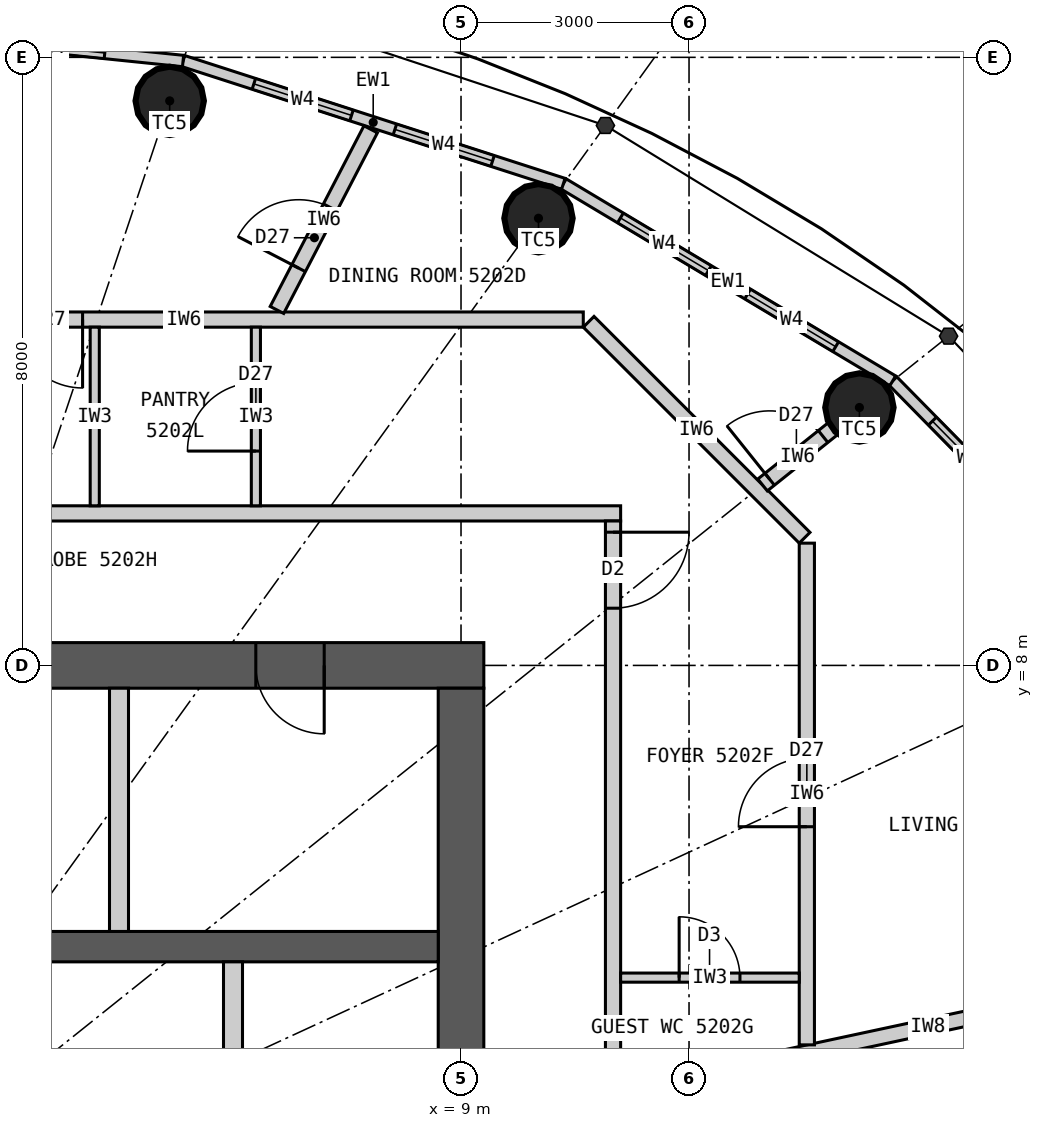
"""IFC4 building model, lengths in metres.
Left out: names, types, materials, properties, quantities, classifications, styles, units other than length and angle.
Written with IfcOpenShell. Run it as: python <this file> out.ifc"""

import sys

from ifc_helpers import new_model, si_unit, direction, frame, frame_2d, origin, origin_2d, place, context, subcontext, project, spatial, rectangle, circle, extrude, element, fill, save


model = new_model("IFC4")
c1 = context("Model", 3, precision=1e-05, world=origin(), true_north=direction((0.0, 1.0)))
c2 = subcontext(c1, "Body", "Model", "MODEL_VIEW")
j1 = project(units=[si_unit("LENGTHUNIT", "METRE"), si_unit("PLANEANGLEUNIT", "RADIAN")], contexts=[c1])
p1 = place(None, origin())
s1 = spatial("IfcSite", under=j1, at=p1, CompositionType="ELEMENT")
p2 = place(p1, origin())
s2 = spatial("IfcBuilding", under=s1, at=p2, CompositionType="ELEMENT")
p3 = place(p2, frame((0.0, 0.0, 196.2)))
s3 = spatial("IfcBuildingStorey", under=s2, at=p3, CompositionType="ELEMENT", Elevation=196.2)
for number, where, z_axis, x_axis in (
    (1, (14.241, 11.393, 0.0), (0.0, 0.0, 1.0), (1.0, 0.0, 0.0)),
    (2, (10.019, 13.883, 0.0), (0.0, 0.0, 1.0), (1.0, 0.0, 0.0)),
    (3, (5.167, 15.427, 0.0), (0.0, 0.0, 1.0), (1.0, 0.0, 0.0)),
):
    element("IfcColumn", number, at=place(p3, frame(where, z_axis=z_axis, x_axis=x_axis)), inside=s3, PredefinedType="COLUMN", context=c2, shape_type="SweptSolid", body=[
        extrude(circle(Radius=0.45, at=origin_2d()), origin(), (0.0, 0.0, 1.0), 3.3),
    ])
p4 = place(p3, frame((-9.3, 8.0, 0.0), z_axis=(0.0, 0.0, 1.0), x_axis=(1.0, 0.0, 0.0)))
e4 = element("IfcWall", 4, at=p4, inside=s3, PredefinedType="SHEAR", context=c2, shape_type="SweptSolid", body=[
    extrude(rectangle(XDim=18.6, YDim=0.6, at=frame_2d((9.3, 0.0))), origin(), (0.0, 0.0, 1.0), 3.3),
])
p5 = place(p4, frame((8.0, 0.0, 0.0)))
e5 = element("IfcOpeningElement", 5, at=p5, cuts=e4, PredefinedType="OPENING", context=c2, shape_type="SweptSolid", body=[
    extrude(rectangle(XDim=1.2, YDim=2.2, at=frame_2d((0.6, 1.1))), frame((0.0, 0.31, 0.0), z_axis=(0.0, -1.0, 0.0), x_axis=(1.0, 0.0, 0.0)), (0.0, 0.0, 1.0), 0.62),
])
p6 = place(p4, frame((15.6, 0.0, 0.0)))
e6 = element("IfcOpeningElement", 6, at=p6, cuts=e4, PredefinedType="OPENING", context=c2, shape_type="SweptSolid", body=[
    extrude(rectangle(XDim=0.9, YDim=2.2, at=frame_2d((0.45, 1.1))), frame((0.0, 0.31, 0.0), z_axis=(0.0, -1.0, 0.0), x_axis=(1.0, 0.0, 0.0)), (0.0, 0.0, 1.0), 0.62),
])
p7 = place(p3, frame((9.0, -7.7, 0.0), z_axis=(0.0, 0.0, 1.0), x_axis=(0.0, 1.0, 0.0)))
e7 = element("IfcWall", 7, at=p7, inside=s3, PredefinedType="SHEAR", context=c2, shape_type="SweptSolid", body=[
    extrude(rectangle(XDim=15.4, YDim=0.6, at=frame_2d((7.7, 0.0))), origin(), (0.0, 0.0, 1.0), 3.3),
])
p8 = place(p7, frame((6.8, 0.0, 0.0)))
e8 = element("IfcOpeningElement", 8, at=p8, cuts=e7, PredefinedType="OPENING", context=c2, shape_type="SweptSolid", body=[
    extrude(rectangle(XDim=1.8, YDim=2.2, at=frame_2d((0.9, 1.1))), frame((0.0, 0.31, 0.0), z_axis=(0.0, -1.0, 0.0), x_axis=(1.0, 0.0, 0.0)), (0.0, 0.0, 1.0), 0.62),
])
p9 = place(p3, frame((-8.7, 4.3, 0.0), z_axis=(0.0, 0.0, 1.0), x_axis=(1.0, 0.0, 0.0)))
e9 = element("IfcWall", 9, at=p9, inside=s3, PredefinedType="SHEAR", context=c2, shape_type="SweptSolid", body=[
    extrude(rectangle(XDim=17.4, YDim=0.4, at=frame_2d((8.7, 0.0))), origin(), (0.0, 0.0, 1.0), 3.3),
])
p10 = place(p3, frame((4.5, 4.5, 0.0), z_axis=(0.0, 0.0, 1.0), x_axis=(0.0, 1.0, 0.0)))
e10 = element("IfcWall", 10, at=p10, inside=s3, PredefinedType="PARTITIONING", context=c2, shape_type="SweptSolid", body=[
    extrude(rectangle(XDim=3.2, YDim=0.25, at=frame_2d((1.6, 0.0))), origin(), (0.0, 0.0, 1.0), 3.3),
])
p11 = place(p3, frame((6.0, 1.75, 0.0), z_axis=(0.0, 0.0, 1.0), x_axis=(0.0, 1.0, 0.0)))
e11 = element("IfcWall", 11, at=p11, inside=s3, PredefinedType="PARTITIONING", context=c2, shape_type="SweptSolid", body=[
    extrude(rectangle(XDim=2.35, YDim=0.25, at=frame_2d((1.175, 0.0))), origin(), (0.0, 0.0, 1.0), 3.3),
])
p12 = place(p3, frame((18.04, 8.332, 0.0), z_axis=(0.0, 0.0, 1.0), x_axis=(-0.701527379618, 0.712642501993, 0.0)))
e12 = element("IfcWall", 12, at=p12, inside=s3, PredefinedType="ELEMENTEDWALL", context=c2, shape_type="SweptSolid", body=[
    extrude(rectangle(XDim=4.788, YDim=0.15, at=frame_2d((2.394, 0.0))), origin(), (0.0, 0.0, 1.0), 3.12),
])
p13 = place(p12, frame((0.744, 0.0, 0.9)))
e13 = element("IfcOpeningElement", 13, at=p13, cuts=e12, PredefinedType="OPENING", context=c2, shape_type="SweptSolid", body=[
    extrude(rectangle(XDim=1.35, YDim=1.9, at=frame_2d((0.675, 0.95))), frame((0.0, 0.085, 0.0), z_axis=(0.0, -1.0, 0.0), x_axis=(1.0, 0.0, 0.0)), (0.0, 0.0, 1.0), 0.17),
])
p14 = place(p12, frame((2.694, 0.0, 0.9)))
e14 = element("IfcOpeningElement", 14, at=p14, cuts=e12, PredefinedType="OPENING", context=c2, shape_type="SweptSolid", body=[
    extrude(rectangle(XDim=1.35, YDim=1.9, at=frame_2d((0.675, 0.95))), frame((0.0, 0.085, 0.0), z_axis=(0.0, -1.0, 0.0), x_axis=(1.0, 0.0, 0.0)), (0.0, 0.0, 1.0), 0.17),
])
p15 = place(p3, frame((14.68, 11.744, 0.0), z_axis=(0.0, 0.0, 1.0), x_axis=(-0.85822150553, 0.513279502265, 0.0)))
e15 = element("IfcWall", 15, at=p15, inside=s3, PredefinedType="ELEMENTEDWALL", context=c2, shape_type="SweptSolid", body=[
    extrude(rectangle(XDim=5.05, YDim=0.15, at=frame_2d((2.525, 0.0))), origin(), (0.0, 0.0, 1.0), 3.12),
])
p16 = place(p15, frame((0.875, 0.0, 0.9)))
e16 = element("IfcOpeningElement", 16, at=p16, cuts=e15, PredefinedType="OPENING", context=c2, shape_type="SweptSolid", body=[
    extrude(rectangle(XDim=1.35, YDim=1.9, at=frame_2d((0.675, 0.95))), frame((0.0, 0.085, 0.0), z_axis=(0.0, -1.0, 0.0), x_axis=(1.0, 0.0, 0.0)), (0.0, 0.0, 1.0), 0.17),
])
p17 = place(p15, frame((2.825, 0.0, 0.9)))
e17 = element("IfcOpeningElement", 17, at=p17, cuts=e15, PredefinedType="OPENING", context=c2, shape_type="SweptSolid", body=[
    extrude(rectangle(XDim=1.35, YDim=1.9, at=frame_2d((0.675, 0.95))), frame((0.0, 0.085, 0.0), z_axis=(0.0, -1.0, 0.0), x_axis=(1.0, 0.0, 0.0)), (0.0, 0.0, 1.0), 0.17),
])
p18 = place(p3, frame((10.346, 14.336, 0.0), z_axis=(0.0, 0.0, 1.0), x_axis=(-0.951644702515, 0.307200846638, 0.0)))
e18 = element("IfcWall", 18, at=p18, inside=s3, PredefinedType="ELEMENTEDWALL", context=c2, shape_type="SweptSolid", body=[
    extrude(rectangle(XDim=5.258, YDim=0.15, at=frame_2d((2.629, 0.0))), origin(), (0.0, 0.0, 1.0), 3.12),
])
p19 = place(p18, frame((0.979, 0.0, 0.9)))
e19 = element("IfcOpeningElement", 19, at=p19, cuts=e18, PredefinedType="OPENING", context=c2, shape_type="SweptSolid", body=[
    extrude(rectangle(XDim=1.35, YDim=1.9, at=frame_2d((0.675, 0.95))), frame((0.0, 0.085, 0.0), z_axis=(0.0, -1.0, 0.0), x_axis=(1.0, 0.0, 0.0)), (0.0, 0.0, 1.0), 0.17),
])
p20 = place(p18, frame((2.929, 0.0, 0.9)))
e20 = element("IfcOpeningElement", 20, at=p20, cuts=e18, PredefinedType="OPENING", context=c2, shape_type="SweptSolid", body=[
    extrude(rectangle(XDim=1.35, YDim=1.9, at=frame_2d((0.675, 0.95))), frame((0.0, 0.085, 0.0), z_axis=(0.0, -1.0, 0.0), x_axis=(1.0, 0.0, 0.0)), (0.0, 0.0, 1.0), 0.17),
])
p21 = place(p3, frame((5.343, 15.952, 0.0), z_axis=(0.0, 0.0, 1.0), x_axis=(-0.994774574972, 0.102095763818, 0.0)))
e21 = element("IfcWall", 21, at=p21, inside=s3, PredefinedType="ELEMENTEDWALL", context=c2, shape_type="SweptSolid", body=[
    extrude(rectangle(XDim=5.371, YDim=0.15, at=frame_2d((2.686, 0.0))), origin(), (0.0, 0.0, 1.0), 3.12),
])
p22 = place(p21, frame((1.035, 0.0, 0.9)))
e22 = element("IfcOpeningElement", 22, at=p22, cuts=e21, PredefinedType="OPENING", context=c2, shape_type="SweptSolid", body=[
    extrude(rectangle(XDim=1.35, YDim=1.9, at=frame_2d((0.675, 0.95))), frame((0.0, 0.085, 0.0), z_axis=(0.0, -1.0, 0.0), x_axis=(1.0, 0.0, 0.0)), (0.0, 0.0, 1.0), 0.17),
])
p23 = place(p21, frame((2.985, 0.0, 0.9)))
e23 = element("IfcOpeningElement", 23, at=p23, cuts=e21, PredefinedType="OPENING", context=c2, shape_type="SweptSolid", body=[
    extrude(rectangle(XDim=1.35, YDim=1.9, at=frame_2d((0.675, 0.95))), frame((0.0, 0.085, 0.0), z_axis=(0.0, -1.0, 0.0), x_axis=(1.0, 0.0, 0.0)), (0.0, 0.0, 1.0), 0.17),
])
p24 = place(p3, frame((-11.1, 10.0, 0.0), z_axis=(0.0, 0.0, 1.0), x_axis=(1.0, 0.0, 0.0)))
e24 = element("IfcWall", 24, at=p24, inside=s3, PredefinedType="PARTITIONING", context=c2, shape_type="SweptSolid", body=[
    extrude(rectangle(XDim=22.2, YDim=0.2, at=frame_2d((11.1, 0.0))), origin(), (0.0, 0.0, 1.0), 3.12),
])
p25 = place(p24, frame((2.309, 0.0, 0.0)))
e25 = element("IfcOpeningElement", 25, at=p25, cuts=e24, PredefinedType="OPENING", context=c2, shape_type="SweptSolid", body=[
    extrude(rectangle(XDim=1.0, YDim=2.2, at=frame_2d((0.5, 1.1))), frame((0.0, 0.11, 0.0), z_axis=(0.0, -1.0, 0.0), x_axis=(1.0, 0.0, 0.0)), (0.0, 0.0, 1.0), 0.22),
])
p26 = place(p3, frame((11.0, -9.9, 0.0), z_axis=(0.0, 0.0, 1.0), x_axis=(0.0, 1.0, 0.0)))
e26 = element("IfcWall", 26, at=p26, inside=s3, PredefinedType="PARTITIONING", context=c2, shape_type="SweptSolid", body=[
    extrude(rectangle(XDim=19.8, YDim=0.2, at=frame_2d((9.9, 0.0))), origin(), (0.0, 0.0, 1.0), 3.12),
])
p27 = place(p26, frame((10.32, 0.0, 0.0)))
e27 = element("IfcOpeningElement", 27, at=p27, cuts=e26, PredefinedType="OPENING", context=c2, shape_type="SweptSolid", body=[
    extrude(rectangle(XDim=1.0, YDim=2.2, at=frame_2d((0.5, 1.1))), frame((0.0, 0.11, 0.0), z_axis=(0.0, -1.0, 0.0), x_axis=(1.0, 0.0, 0.0)), (0.0, 0.0, 1.0), 0.22),
])
p28 = place(p26, frame((18.653, 0.0, 0.0)))
e28 = element("IfcOpeningElement", 28, at=p28, cuts=e26, PredefinedType="OPENING", context=c2, shape_type="SweptSolid", body=[
    extrude(rectangle(XDim=1.0, YDim=2.2, at=frame_2d((0.5, 1.1))), frame((0.0, 0.11, 0.0), z_axis=(0.0, -1.0, 0.0), x_axis=(1.0, 0.0, 0.0)), (0.0, 0.0, 1.0), 0.22),
])
p29 = place(p26, frame((0.379, 0.0, 0.0)))
e29 = element("IfcOpeningElement", 29, at=p29, cuts=e26, PredefinedType="OPENING", context=c2, shape_type="SweptSolid", body=[
    extrude(rectangle(XDim=1.0, YDim=2.2, at=frame_2d((0.5, 1.1))), frame((0.0, 0.11, 0.0), z_axis=(0.0, -1.0, 0.0), x_axis=(1.0, 0.0, 0.0)), (0.0, 0.0, 1.0), 0.22),
])
p30 = place(p3, frame((11.1, 2.379, 0.0), z_axis=(0.0, 0.0, 1.0), x_axis=(0.977789888126, 0.209587534647, 0.0)))
e30 = element("IfcWall", 30, at=p30, inside=s3, PredefinedType="PARTITIONING", context=c2, shape_type="SweptSolid", body=[
    extrude(rectangle(XDim=8.273, YDim=0.2, at=frame_2d((4.136, 0.0))), origin(), (0.0, 0.0, 1.0), 2.42),
])
p31 = place(p3, frame((13.55, 3.008, 0.0), z_axis=(0.0, 0.0, 1.0), x_axis=(0.0, 1.0, 0.0)))
e31 = element("IfcWall", 31, at=p31, inside=s3, PredefinedType="PARTITIONING", context=c2, shape_type="SweptSolid", body=[
    extrude(rectangle(XDim=6.601, YDim=0.2, at=frame_2d((3.3, 0.0))), origin(), (0.0, 0.0, 1.0), 3.12),
])
p32 = place(p31, frame((2.87, 0.0, 0.0)))
e32 = element("IfcOpeningElement", 32, at=p32, cuts=e31, PredefinedType="OPENING", context=c2, shape_type="SweptSolid", body=[
    extrude(rectangle(XDim=0.9, YDim=2.1, at=frame_2d((0.45, 1.05))), frame((0.0, 0.11, 0.0), z_axis=(0.0, -1.0, 0.0), x_axis=(1.0, 0.0, 0.0)), (0.0, 0.0, 1.0), 0.22),
])
p33 = place(p3, frame((13.521, 9.679, 0.0), z_axis=(0.0, 0.0, 1.0), x_axis=(-0.707106781187, 0.707106781187, 0.0)))
e33 = element("IfcWall", 33, at=p33, inside=s3, PredefinedType="PARTITIONING", context=c2, shape_type="SweptSolid", body=[
    extrude(rectangle(XDim=4.019, YDim=0.2, at=frame_2d((2.009, 0.0))), origin(), (0.0, 0.0, 1.0), 3.12),
])
p34 = place(p3, frame((10.609, 12.55, 0.0), z_axis=(0.0, 0.0, 1.0), x_axis=(-1.0, 0.0, 0.0)))
e34 = element("IfcWall", 34, at=p34, inside=s3, PredefinedType="PARTITIONING", context=c2, shape_type="SweptSolid", body=[
    extrude(rectangle(XDim=10.508, YDim=0.2, at=frame_2d((5.254, 0.0))), origin(), (0.0, 0.0, 1.0), 3.12),
])
p35 = place(p34, frame((6.588, 0.0, 0.0)))
e35 = element("IfcOpeningElement", 35, at=p35, cuts=e34, PredefinedType="OPENING", context=c2, shape_type="SweptSolid", body=[
    extrude(rectangle(XDim=0.9, YDim=2.1, at=frame_2d((0.45, 1.05))), frame((0.0, 0.11, 0.0), z_axis=(0.0, -1.0, 0.0), x_axis=(1.0, 0.0, 0.0)), (0.0, 0.0, 1.0), 0.22),
])
p36 = place(p34, frame((8.308, 0.0, 0.0)))
e36 = element("IfcOpeningElement", 36, at=p36, cuts=e34, PredefinedType="OPENING", context=c2, shape_type="SweptSolid", body=[
    extrude(rectangle(XDim=0.8, YDim=2.1, at=frame_2d((0.4, 1.05))), frame((0.0, 0.11, 0.0), z_axis=(0.0, -1.0, 0.0), x_axis=(1.0, 0.0, 0.0)), (0.0, 0.0, 1.0), 0.22),
])
p37 = place(p3, frame((12.968, 10.374, 0.0), z_axis=(0.0, 0.0, 1.0), x_axis=(0.780888968944, 0.624669847345, 0.0)))
e37 = element("IfcWall", 37, at=p37, inside=s3, PredefinedType="PARTITIONING", context=c2, shape_type="SweptSolid", body=[
    extrude(rectangle(XDim=1.181, YDim=0.2, at=frame_2d((0.591, 0.0))), origin(), (0.0, 0.0, 1.0), 2.42),
])
p38 = place(p37, frame((0.12, 0.0, 0.0)))
e38 = element("IfcOpeningElement", 38, at=p38, cuts=e37, PredefinedType="OPENING", context=c2, shape_type="SweptSolid", body=[
    extrude(rectangle(XDim=0.9, YDim=2.1, at=frame_2d((0.45, 1.05))), frame((0.0, 0.11, 0.0), z_axis=(0.0, -1.0, 0.0), x_axis=(1.0, 0.0, 0.0)), (0.0, 0.0, 1.0), 0.22),
])
p39 = place(p3, frame((6.578, 12.677, 0.0), z_axis=(0.0, 0.0, 1.0), x_axis=(0.460620531465, 0.887597164255, 0.0)))
e39 = element("IfcWall", 39, at=p39, inside=s3, PredefinedType="PARTITIONING", context=c2, shape_type="SweptSolid", body=[
    extrude(rectangle(XDim=2.678, YDim=0.2, at=frame_2d((1.339, 0.0))), origin(), (0.0, 0.0, 1.0), 3.12),
])
p40 = place(p39, frame((0.62, 0.0, 0.0)))
e40 = element("IfcOpeningElement", 40, at=p40, cuts=e39, PredefinedType="OPENING", context=c2, shape_type="SweptSolid", body=[
    extrude(rectangle(XDim=0.9, YDim=2.1, at=frame_2d((0.45, 1.05))), frame((0.0, 0.11, 0.0), z_axis=(0.0, -1.0, 0.0), x_axis=(1.0, 0.0, 0.0)), (0.0, 0.0, 1.0), 0.22),
])
p41 = place(p3, frame((11.1, 3.893, 0.0), z_axis=(0.0, 0.0, 1.0), x_axis=(1.0, 0.0, 0.0)))
e41 = element("IfcWall", 41, at=p41, inside=s3, PredefinedType="PARTITIONING", context=c2, shape_type="SweptSolid", body=[
    extrude(rectangle(XDim=2.35, YDim=0.12, at=frame_2d((1.175, 0.0))), origin(), (0.0, 0.0, 1.0), 3.12),
])
p42 = place(p41, frame((0.77, 0.0, 0.0)))
e42 = element("IfcOpeningElement", 42, at=p42, cuts=e41, PredefinedType="OPENING", context=c2, shape_type="SweptSolid", body=[
    extrude(rectangle(XDim=0.8, YDim=2.1, at=frame_2d((0.4, 1.05))), frame((0.0, 0.07, 0.0), z_axis=(0.0, -1.0, 0.0), x_axis=(1.0, 0.0, 0.0)), (0.0, 0.0, 1.0), 0.14),
])
p43 = place(p3, frame((6.301, 10.1, 0.0), z_axis=(0.0, 0.0, 1.0), x_axis=(0.0, 1.0, 0.0)))
e43 = element("IfcWall", 43, at=p43, inside=s3, PredefinedType="PARTITIONING", context=c2, shape_type="SweptSolid", body=[
    extrude(rectangle(XDim=2.35, YDim=0.12, at=frame_2d((1.175, 0.0))), origin(), (0.0, 0.0, 1.0), 3.12),
])
p44 = place(p43, frame((0.72, 0.0, 0.0)))
e44 = element("IfcOpeningElement", 44, at=p44, cuts=e43, PredefinedType="OPENING", context=c2, shape_type="SweptSolid", body=[
    extrude(rectangle(XDim=0.9, YDim=2.1, at=frame_2d((0.45, 1.05))), frame((0.0, 0.07, 0.0), z_axis=(0.0, -1.0, 0.0), x_axis=(1.0, 0.0, 0.0)), (0.0, 0.0, 1.0), 0.14),
])
p45 = place(p3, frame((4.181, 10.1, 0.0), z_axis=(0.0, 0.0, 1.0), x_axis=(0.0, 1.0, 0.0)))
e45 = element("IfcWall", 45, at=p45, inside=s3, PredefinedType="PARTITIONING", context=c2, shape_type="SweptSolid", body=[
    extrude(rectangle(XDim=2.35, YDim=0.12, at=frame_2d((1.175, 0.0))), origin(), (0.0, 0.0, 1.0), 3.12),
])
p46 = place(p14, origin())
e46 = element("IfcWindow", 46, at=p46, inside=s3, PartitioningType="SINGLE_PANEL", PredefinedType="WINDOW", context=c2, shape_type="SweptSolid", body=[
    extrude(rectangle(XDim=1.35, YDim=1.9, at=frame_2d((0.675, 0.95))), frame((0.0, 0.03, 0.0), z_axis=(0.0, -1.0, 0.0), x_axis=(1.0, 0.0, 0.0)), (0.0, 0.0, 1.0), 0.06),
])
fill(e14, e46)
p47 = place(p16, origin())
e47 = element("IfcWindow", 47, at=p47, inside=s3, PartitioningType="SINGLE_PANEL", PredefinedType="WINDOW", context=c2, shape_type="SweptSolid", body=[
    extrude(rectangle(XDim=1.35, YDim=1.9, at=frame_2d((0.675, 0.95))), frame((0.0, 0.03, 0.0), z_axis=(0.0, -1.0, 0.0), x_axis=(1.0, 0.0, 0.0)), (0.0, 0.0, 1.0), 0.06),
])
fill(e16, e47)
p48 = place(p17, origin())
e48 = element("IfcWindow", 48, at=p48, inside=s3, PartitioningType="SINGLE_PANEL", PredefinedType="WINDOW", context=c2, shape_type="SweptSolid", body=[
    extrude(rectangle(XDim=1.35, YDim=1.9, at=frame_2d((0.675, 0.95))), frame((0.0, 0.03, 0.0), z_axis=(0.0, -1.0, 0.0), x_axis=(1.0, 0.0, 0.0)), (0.0, 0.0, 1.0), 0.06),
])
fill(e17, e48)
p49 = place(p19, origin())
e49 = element("IfcWindow", 49, at=p49, inside=s3, PartitioningType="SINGLE_PANEL", PredefinedType="WINDOW", context=c2, shape_type="SweptSolid", body=[
    extrude(rectangle(XDim=1.35, YDim=1.9, at=frame_2d((0.675, 0.95))), frame((0.0, 0.03, 0.0), z_axis=(0.0, -1.0, 0.0), x_axis=(1.0, 0.0, 0.0)), (0.0, 0.0, 1.0), 0.06),
])
fill(e19, e49)
p50 = place(p20, origin())
e50 = element("IfcWindow", 50, at=p50, inside=s3, PartitioningType="SINGLE_PANEL", PredefinedType="WINDOW", context=c2, shape_type="SweptSolid", body=[
    extrude(rectangle(XDim=1.35, YDim=1.9, at=frame_2d((0.675, 0.95))), frame((0.0, 0.03, 0.0), z_axis=(0.0, -1.0, 0.0), x_axis=(1.0, 0.0, 0.0)), (0.0, 0.0, 1.0), 0.06),
])
fill(e20, e50)
p51 = place(p22, origin())
e51 = element("IfcWindow", 51, at=p51, inside=s3, PartitioningType="SINGLE_PANEL", PredefinedType="WINDOW", context=c2, shape_type="SweptSolid", body=[
    extrude(rectangle(XDim=1.35, YDim=1.9, at=frame_2d((0.675, 0.95))), frame((0.0, 0.03, 0.0), z_axis=(0.0, -1.0, 0.0), x_axis=(1.0, 0.0, 0.0)), (0.0, 0.0, 1.0), 0.06),
])
fill(e22, e51)
p52 = place(p28, origin())
e52 = element("IfcDoor", 52, at=p52, inside=s3, OperationType="SINGLE_SWING_RIGHT", PredefinedType="DOOR", context=c2, shape_type="SweptSolid", body=[
    extrude(rectangle(XDim=1.0, YDim=2.2, at=frame_2d((0.5, 1.1))), frame((0.0, 0.025, 0.0), z_axis=(0.0, -1.0, 0.0), x_axis=(1.0, 0.0, 0.0)), (0.0, 0.0, 1.0), 0.05),
])
fill(e28, e52)
p53 = place(p42, origin())
e53 = element("IfcDoor", 53, at=p53, inside=s3, OperationType="SINGLE_SWING_LEFT", PredefinedType="DOOR", context=c2, shape_type="SweptSolid", body=[
    extrude(rectangle(XDim=0.8, YDim=2.1, at=frame_2d((0.4, 1.05))), frame((0.0, 0.025, 0.0), z_axis=(0.0, -1.0, 0.0), x_axis=(1.0, 0.0, 0.0)), (0.0, 0.0, 1.0), 0.05),
])
fill(e42, e53)
p54 = place(p44, origin())
e54 = element("IfcDoor", 54, at=p54, inside=s3, OperationType="SINGLE_SWING_LEFT", PredefinedType="DOOR", context=c2, shape_type="SweptSolid", body=[
    extrude(rectangle(XDim=0.9, YDim=2.1, at=frame_2d((0.45, 1.05))), frame((0.0, 0.025, 0.0), z_axis=(0.0, -1.0, 0.0), x_axis=(1.0, 0.0, 0.0)), (0.0, 0.0, 1.0), 0.05),
])
fill(e44, e54)
p55 = place(p35, origin())
e55 = element("IfcDoor", 55, at=p55, inside=s3, OperationType="SINGLE_SWING_LEFT", PredefinedType="DOOR", context=c2, shape_type="SweptSolid", body=[
    extrude(rectangle(XDim=0.9, YDim=2.1, at=frame_2d((0.45, 1.05))), frame((0.0, 0.025, 0.0), z_axis=(0.0, -1.0, 0.0), x_axis=(1.0, 0.0, 0.0)), (0.0, 0.0, 1.0), 0.05),
])
fill(e35, e55)
p56 = place(p32, origin())
e56 = element("IfcDoor", 56, at=p56, inside=s3, OperationType="SINGLE_SWING_LEFT", PredefinedType="DOOR", context=c2, shape_type="SweptSolid", body=[
    extrude(rectangle(XDim=0.9, YDim=2.1, at=frame_2d((0.45, 1.05))), frame((0.0, 0.025, 0.0), z_axis=(0.0, -1.0, 0.0), x_axis=(1.0, 0.0, 0.0)), (0.0, 0.0, 1.0), 0.05),
])
fill(e32, e56)
p57 = place(p38, origin())
e57 = element("IfcDoor", 57, at=p57, inside=s3, OperationType="SINGLE_SWING_LEFT", PredefinedType="DOOR", context=c2, shape_type="SweptSolid", body=[
    extrude(rectangle(XDim=0.9, YDim=2.1, at=frame_2d((0.45, 1.05))), frame((0.0, 0.025, 0.0), z_axis=(0.0, -1.0, 0.0), x_axis=(1.0, 0.0, 0.0)), (0.0, 0.0, 1.0), 0.05),
])
fill(e38, e57)
p58 = place(p40, origin())
e58 = element("IfcDoor", 58, at=p58, inside=s3, OperationType="SINGLE_SWING_LEFT", PredefinedType="DOOR", context=c2, shape_type="SweptSolid", body=[
    extrude(rectangle(XDim=0.9, YDim=2.1, at=frame_2d((0.45, 1.05))), frame((0.0, 0.025, 0.0), z_axis=(0.0, -1.0, 0.0), x_axis=(1.0, 0.0, 0.0)), (0.0, 0.0, 1.0), 0.05),
])
fill(e40, e58)
p59 = place(p6, origin())
e59 = element("IfcDoor", 59, at=p59, inside=s3, OperationType="SINGLE_SWING_RIGHT", PredefinedType="DOOR", context=c2, shape_type="SweptSolid", body=[
    extrude(rectangle(XDim=0.9, YDim=2.2, at=frame_2d((0.45, 1.1))), frame((0.0, 0.025, 0.0), z_axis=(0.0, -1.0, 0.0), x_axis=(1.0, 0.0, 0.0)), (0.0, 0.0, 1.0), 0.05),
])
fill(e6, e59)
save(model, sys.argv[1])
